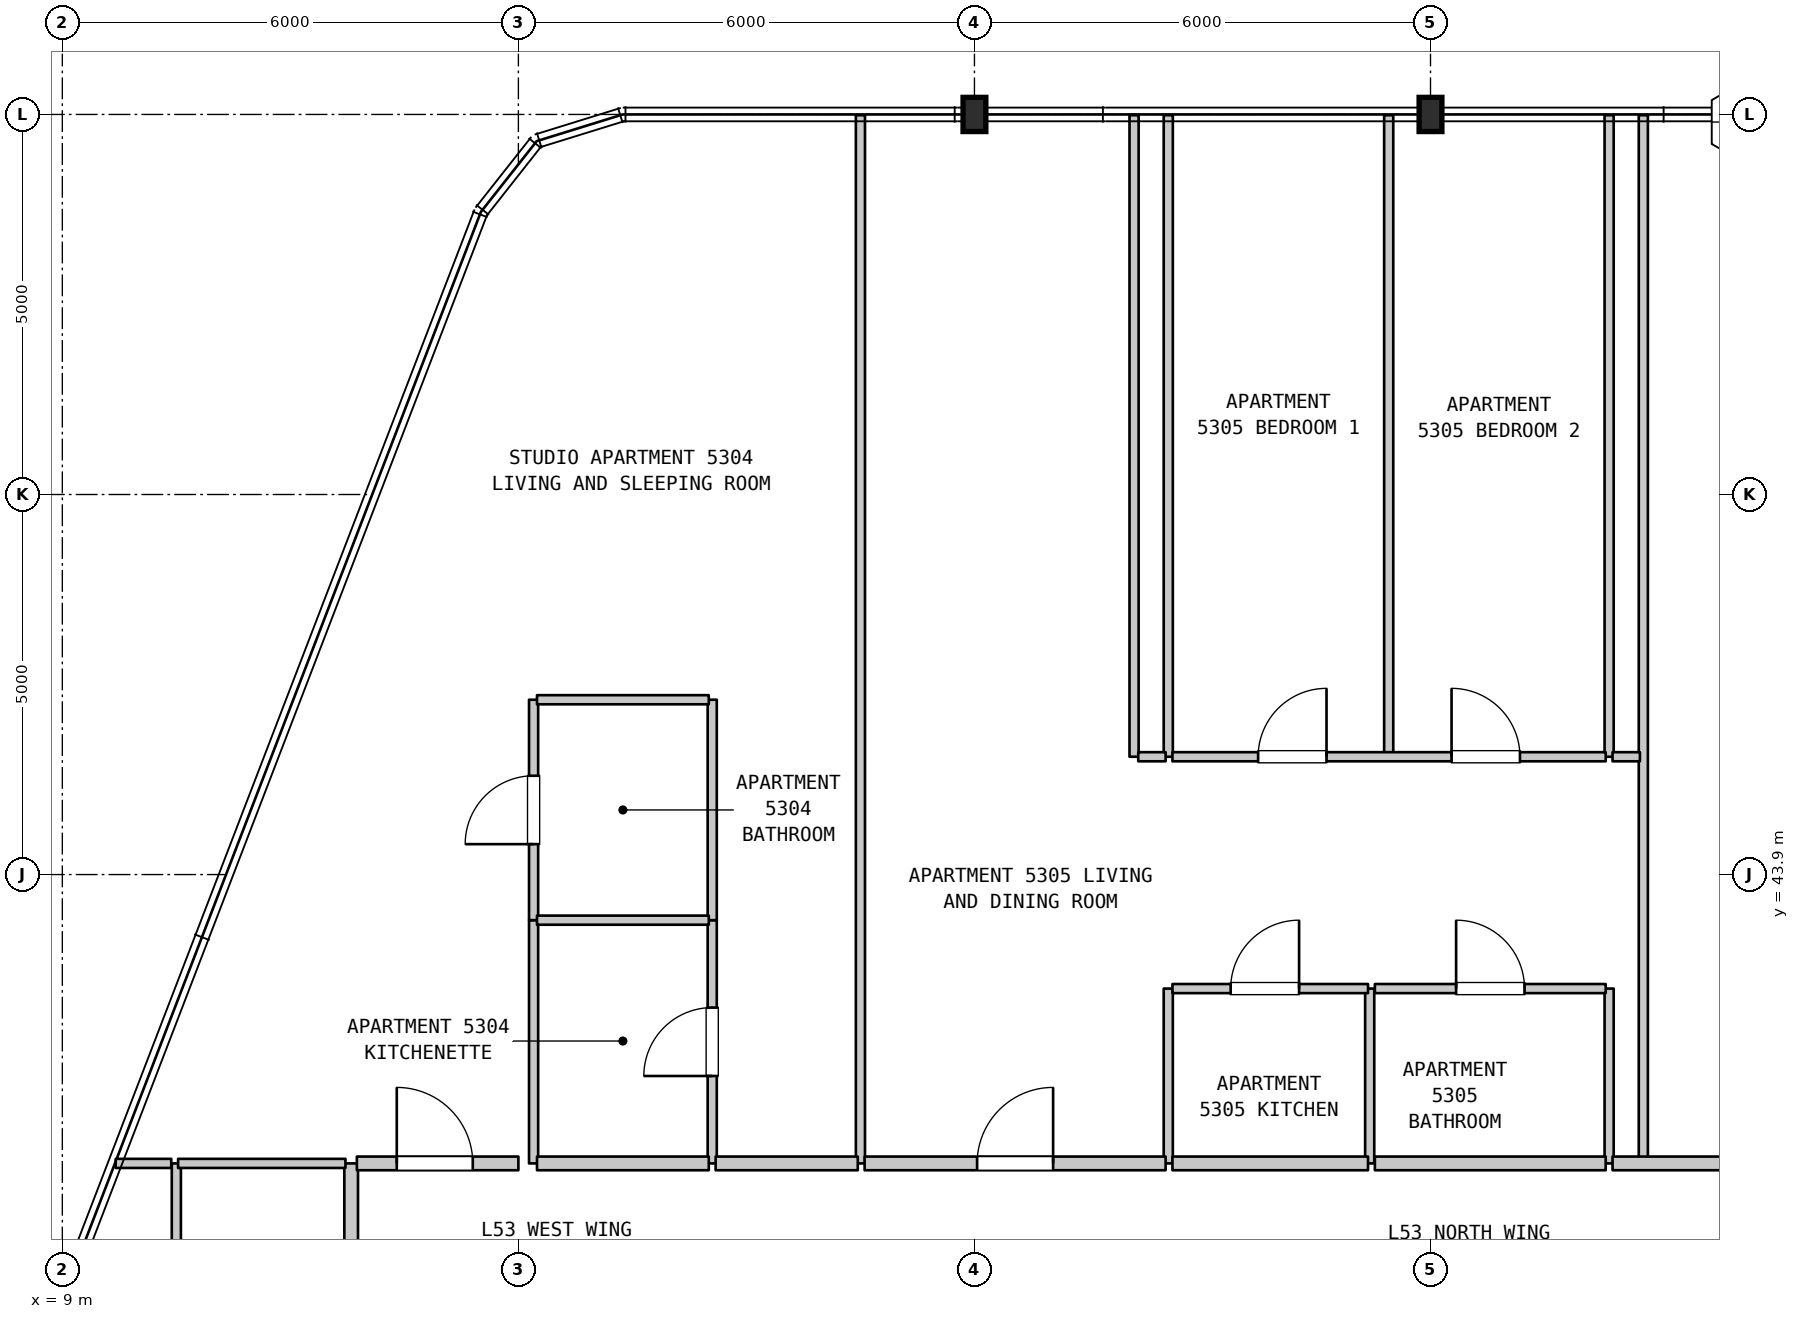
"""IFC4 building model, lengths in metres.
Left out: names, types, materials, properties, quantities, classifications, styles, units other than length and angle.
Written with IfcOpenShell. Run it as: python <this file> out.ifc"""

import sys

from ifc_helpers import new_model, si_unit, direction, frame, frame_2d, origin, origin_2d, place, context, subcontext, project, spatial, rectangle, i_section, extrude, element, fill, save


model = new_model("IFC4")
c1 = context("Model", 3, precision=1e-05, world=origin(), true_north=direction((0.0, 1.0)))
c2 = subcontext(c1, "Body", "Model", "MODEL_VIEW")
j1 = project(units=[si_unit("LENGTHUNIT", "METRE"), si_unit("PLANEANGLEUNIT", "RADIAN")], contexts=[c1])
p1 = place(None, origin())
s1 = spatial("IfcSite", under=j1, at=p1, CompositionType="ELEMENT")
p2 = place(p1, origin())
s2 = spatial("IfcBuilding", under=s1, at=p2, CompositionType="ELEMENT")
p3 = place(p2, frame((0.0, 0.0, 214.3)))
s3 = spatial("IfcBuildingStorey", under=s2, at=p3, CompositionType="ELEMENT", Elevation=214.3)
for number, where, z_axis, x_axis in (
    (1, (21.0, 53.9, 0.0), (0.0, 0.0, 1.0), (1.0, 0.0, 0.0)),
    (2, (27.0, 53.9, 0.0), (0.0, 0.0, 1.0), (1.0, 0.0, 0.0)),
):
    element("IfcColumn", number, at=place(p3, frame(where, z_axis=z_axis, x_axis=x_axis)), inside=s3, PredefinedType="COLUMN", context=c2, shape_type="SweptSolid", body=[
        extrude(i_section(OverallWidth=0.3, OverallDepth=0.45, WebThickness=0.014, FlangeThickness=0.026, FilletRadius=0.027, at=origin_2d()), origin(), (0.0, 0.0, 1.0), 3.7),
    ])
p4 = place(p3, frame((10.5, 31.45, 0.0), z_axis=(0.0, 0.0, 1.0), x_axis=(0.0, 1.0, 0.0)))
e3 = element("IfcWall", 3, at=p4, inside=s3, PredefinedType="PARTITIONING", context=c2, shape_type="SweptSolid", body=[
    extrude(rectangle(XDim=8.65, YDim=0.12, at=frame_2d((4.325, 0.0))), origin(), (0.0, 0.0, 1.0), 3.38),
])
p5 = place(p3, frame((12.8, 31.45, 0.0), z_axis=(0.0, 0.0, 1.0), x_axis=(0.0, 1.0, 0.0)))
e4 = element("IfcWall", 4, at=p5, inside=s3, PredefinedType="STANDARD", context=c2, shape_type="SweptSolid", body=[
    extrude(rectangle(XDim=8.65, YDim=0.18, at=frame_2d((4.325, 0.0))), origin(), (0.0, 0.0, 1.0), 3.38),
])
p6 = place(p3, frame((15.2, 40.1, 0.0), z_axis=(0.0, 0.0, 1.0), x_axis=(0.0, 1.0, 0.0)))
e5 = element("IfcWall", 5, at=p6, inside=s3, PredefinedType="PARTITIONING", context=c2, shape_type="SweptSolid", body=[
    extrude(rectangle(XDim=3.2, YDim=0.12, at=frame_2d((1.6, 0.0))), origin(), (0.0, 0.0, 1.0), 3.38),
])
p7 = place(p3, frame((15.2, 43.3, 0.0), z_axis=(0.0, 0.0, 1.0), x_axis=(0.0, 1.0, 0.0)))
e6 = element("IfcWall", 6, at=p7, inside=s3, PredefinedType="PARTITIONING", context=c2, shape_type="SweptSolid", body=[
    extrude(rectangle(XDim=2.9, YDim=0.12, at=frame_2d((1.45, 0.0))), origin(), (0.0, 0.0, 1.0), 3.38),
])
p8 = place(p7, frame((1.0, 0.0, 0.0)))
e7 = element("IfcOpeningElement", 7, at=p8, cuts=e6, PredefinedType="OPENING", context=c2, shape_type="SweptSolid", body=[
    extrude(rectangle(XDim=0.9, YDim=2.1, at=frame_2d((0.45, 1.05))), frame((0.0, 0.07, 0.0), z_axis=(0.0, -1.0, 0.0), x_axis=(1.0, 0.0, 0.0)), (0.0, 0.0, 1.0), 0.14),
])
p9 = place(p3, frame((17.55, 40.1, 0.0), z_axis=(0.0, 0.0, 1.0), x_axis=(0.0, 1.0, 0.0)))
e8 = element("IfcWall", 8, at=p9, inside=s3, PredefinedType="PARTITIONING", context=c2, shape_type="SweptSolid", body=[
    extrude(rectangle(XDim=3.2, YDim=0.12, at=frame_2d((1.6, 0.0))), origin(), (0.0, 0.0, 1.0), 3.38),
])
p10 = place(p9, frame((1.15, 0.0, 0.0)))
e9 = element("IfcOpeningElement", 9, at=p10, cuts=e8, PredefinedType="OPENING", context=c2, shape_type="SweptSolid", body=[
    extrude(rectangle(XDim=0.9, YDim=2.15, at=frame_2d((0.45, 1.075))), frame((0.0, 0.07, 0.0), z_axis=(0.0, -1.0, 0.0), x_axis=(1.0, 0.0, 0.0)), (0.0, 0.0, 1.0), 0.14),
])
p11 = place(p3, frame((17.55, 43.3, 0.0), z_axis=(0.0, 0.0, 1.0), x_axis=(0.0, 1.0, 0.0)))
e10 = element("IfcWall", 10, at=p11, inside=s3, PredefinedType="PARTITIONING", context=c2, shape_type="SweptSolid", body=[
    extrude(rectangle(XDim=2.9, YDim=0.12, at=frame_2d((1.45, 0.0))), origin(), (0.0, 0.0, 1.0), 3.38),
])
p12 = place(p3, frame((19.5, 40.1, 0.0), z_axis=(0.0, 0.0, 1.0), x_axis=(0.0, 1.0, 0.0)))
e11 = element("IfcWall", 11, at=p12, inside=s3, PredefinedType="PARTITIONING", context=c2, shape_type="SweptSolid", body=[
    extrude(rectangle(XDim=13.79, YDim=0.12, at=frame_2d((6.895, 0.0))), origin(), (0.0, 0.0, 1.0), 3.38),
])
p13 = place(p3, frame((23.1, 45.45, 0.0), z_axis=(0.0, 0.0, 1.0), x_axis=(0.0, 1.0, 0.0)))
e12 = element("IfcWall", 12, at=p13, inside=s3, PredefinedType="PARTITIONING", context=c2, shape_type="SweptSolid", body=[
    extrude(rectangle(XDim=8.44, YDim=0.12, at=frame_2d((4.22, 0.0))), origin(), (0.0, 0.0, 1.0), 3.38),
])
p14 = place(p3, frame((23.55, 40.1, 0.0), z_axis=(0.0, 0.0, 1.0), x_axis=(0.0, 1.0, 0.0)))
e13 = element("IfcWall", 13, at=p14, inside=s3, PredefinedType="PARTITIONING", context=c2, shape_type="SweptSolid", body=[
    extrude(rectangle(XDim=2.3, YDim=0.12, at=frame_2d((1.15, 0.0))), origin(), (0.0, 0.0, 1.0), 3.38),
])
p15 = place(p3, frame((23.55, 45.45, 0.0), z_axis=(0.0, 0.0, 1.0), x_axis=(0.0, 1.0, 0.0)))
e14 = element("IfcWall", 14, at=p15, inside=s3, PredefinedType="PARTITIONING", context=c2, shape_type="SweptSolid", body=[
    extrude(rectangle(XDim=8.44, YDim=0.12, at=frame_2d((4.22, 0.0))), origin(), (0.0, 0.0, 1.0), 3.38),
])
p16 = place(p3, frame((26.2, 40.1, 0.0), z_axis=(0.0, 0.0, 1.0), x_axis=(0.0, 1.0, 0.0)))
e15 = element("IfcWall", 15, at=p16, inside=s3, PredefinedType="PARTITIONING", context=c2, shape_type="SweptSolid", body=[
    extrude(rectangle(XDim=2.3, YDim=0.12, at=frame_2d((1.15, 0.0))), origin(), (0.0, 0.0, 1.0), 3.38),
])
p17 = place(p3, frame((26.45, 45.45, 0.0), z_axis=(0.0, 0.0, 1.0), x_axis=(0.0, 1.0, 0.0)))
e16 = element("IfcWall", 16, at=p17, inside=s3, PredefinedType="PARTITIONING", context=c2, shape_type="SweptSolid", body=[
    extrude(rectangle(XDim=8.44, YDim=0.12, at=frame_2d((4.22, 0.0))), origin(), (0.0, 0.0, 1.0), 3.38),
])
p18 = place(p3, frame((29.35, 40.1, 0.0), z_axis=(0.0, 0.0, 1.0), x_axis=(0.0, 1.0, 0.0)))
e17 = element("IfcWall", 17, at=p18, inside=s3, PredefinedType="PARTITIONING", context=c2, shape_type="SweptSolid", body=[
    extrude(rectangle(XDim=2.3, YDim=0.12, at=frame_2d((1.15, 0.0))), origin(), (0.0, 0.0, 1.0), 3.38),
])
p19 = place(p3, frame((29.35, 45.45, 0.0), z_axis=(0.0, 0.0, 1.0), x_axis=(0.0, 1.0, 0.0)))
e18 = element("IfcWall", 18, at=p19, inside=s3, PredefinedType="PARTITIONING", context=c2, shape_type="SweptSolid", body=[
    extrude(rectangle(XDim=8.44, YDim=0.12, at=frame_2d((4.22, 0.0))), origin(), (0.0, 0.0, 1.0), 3.38),
])
p20 = place(p3, frame((29.8, 40.1, 0.0), z_axis=(0.0, 0.0, 1.0), x_axis=(0.0, 1.0, 0.0)))
e19 = element("IfcWall", 19, at=p20, inside=s3, PredefinedType="PARTITIONING", context=c2, shape_type="SweptSolid", body=[
    extrude(rectangle(XDim=13.79, YDim=0.12, at=frame_2d((6.895, 0.0))), origin(), (0.0, 0.0, 1.0), 3.38),
])
p21 = place(p3, frame((9.702, 40.1, 0.0), z_axis=(0.0, 0.0, 1.0), x_axis=(1.0, 0.0, 0.0)))
e20 = element("IfcWall", 20, at=p21, inside=s3, PredefinedType="PARTITIONING", context=c2, shape_type="SweptSolid", body=[
    extrude(rectangle(XDim=0.731, YDim=0.12, at=frame_2d((0.366, 0.0))), origin(), (0.0, 0.0, 1.0), 3.38),
])
p22 = place(p3, frame((10.523, 40.1, 0.0), z_axis=(0.0, 0.0, 1.0), x_axis=(1.0, 0.0, 0.0)))
e21 = element("IfcWall", 21, at=p22, inside=s3, PredefinedType="PARTITIONING", context=c2, shape_type="SweptSolid", body=[
    extrude(rectangle(XDim=2.202, YDim=0.12, at=frame_2d((1.101, 0.0))), origin(), (0.0, 0.0, 1.0), 3.38),
])
p23 = place(p3, frame((12.875, 40.1, 0.0), z_axis=(0.0, 0.0, 1.0), x_axis=(1.0, 0.0, 0.0)))
e22 = element("IfcWall", 22, at=p23, inside=s3, PredefinedType="STANDARD", context=c2, shape_type="SweptSolid", body=[
    extrude(rectangle(XDim=2.125, YDim=0.18, at=frame_2d((1.062, 0.0))), origin(), (0.0, 0.0, 1.0), 3.38),
])
p24 = place(p23, frame((0.525, 0.0, 0.0)))
e23 = element("IfcOpeningElement", 23, at=p24, cuts=e22, PredefinedType="OPENING", context=c2, shape_type="SweptSolid", body=[
    extrude(rectangle(XDim=1.0, YDim=2.15, at=frame_2d((0.5, 1.075))), frame((0.0, 0.1, 0.0), z_axis=(0.0, -1.0, 0.0), x_axis=(1.0, 0.0, 0.0)), (0.0, 0.0, 1.0), 0.2),
])
p25 = place(p3, frame((15.245, 40.1, 0.0), z_axis=(0.0, 0.0, 1.0), x_axis=(1.0, 0.0, 0.0)))
e24 = element("IfcWall", 24, at=p25, inside=s3, PredefinedType="STANDARD", context=c2, shape_type="SweptSolid", body=[
    extrude(rectangle(XDim=2.26, YDim=0.18, at=frame_2d((1.13, 0.0))), origin(), (0.0, 0.0, 1.0), 3.38),
])
p26 = place(p3, frame((17.595, 40.1, 0.0), z_axis=(0.0, 0.0, 1.0), x_axis=(1.0, 0.0, 0.0)))
e25 = element("IfcWall", 25, at=p26, inside=s3, PredefinedType="STANDARD", context=c2, shape_type="SweptSolid", body=[
    extrude(rectangle(XDim=1.87, YDim=0.18, at=frame_2d((0.935, 0.0))), origin(), (0.0, 0.0, 1.0), 3.38),
])
p27 = place(p3, frame((19.555, 40.1, 0.0), z_axis=(0.0, 0.0, 1.0), x_axis=(1.0, 0.0, 0.0)))
e26 = element("IfcWall", 26, at=p27, inside=s3, PredefinedType="STANDARD", context=c2, shape_type="SweptSolid", body=[
    extrude(rectangle(XDim=3.96, YDim=0.18, at=frame_2d((1.98, 0.0))), origin(), (0.0, 0.0, 1.0), 3.38),
])
p28 = place(p27, frame((1.48, 0.0, 0.0)))
e27 = element("IfcOpeningElement", 27, at=p28, cuts=e26, PredefinedType="OPENING", context=c2, shape_type="SweptSolid", body=[
    extrude(rectangle(XDim=1.0, YDim=2.15, at=frame_2d((0.5, 1.075))), frame((0.0, 0.1, 0.0), z_axis=(0.0, -1.0, 0.0), x_axis=(1.0, 0.0, 0.0)), (0.0, 0.0, 1.0), 0.2),
])
p29 = place(p3, frame((23.605, 40.1, 0.0), z_axis=(0.0, 0.0, 1.0), x_axis=(1.0, 0.0, 0.0)))
e28 = element("IfcWall", 28, at=p29, inside=s3, PredefinedType="STANDARD", context=c2, shape_type="SweptSolid", body=[
    extrude(rectangle(XDim=2.573, YDim=0.18, at=frame_2d((1.287, 0.0))), origin(), (0.0, 0.0, 1.0), 3.38),
])
p30 = place(p3, frame((26.268, 40.1, 0.0), z_axis=(0.0, 0.0, 1.0), x_axis=(1.0, 0.0, 0.0)))
e29 = element("IfcWall", 29, at=p30, inside=s3, PredefinedType="STANDARD", context=c2, shape_type="SweptSolid", body=[
    extrude(rectangle(XDim=3.037, YDim=0.18, at=frame_2d((1.519, 0.0))), origin(), (0.0, 0.0, 1.0), 3.38),
])
p31 = place(p3, frame((29.395, 40.1, 0.0), z_axis=(0.0, 0.0, 1.0), x_axis=(1.0, 0.0, 0.0)))
e30 = element("IfcWall", 30, at=p31, inside=s3, PredefinedType="STANDARD", context=c2, shape_type="SweptSolid", body=[
    extrude(rectangle(XDim=5.09, YDim=0.18, at=frame_2d((2.545, 0.0))), origin(), (0.0, 0.0, 1.0), 3.38),
])
p32 = place(p31, frame((2.174, 0.0, 0.0)))
e31 = element("IfcOpeningElement", 31, at=p32, cuts=e30, PredefinedType="OPENING", context=c2, shape_type="SweptSolid", body=[
    extrude(rectangle(XDim=1.0, YDim=2.15, at=frame_2d((0.5, 1.075))), frame((0.0, 0.1, 0.0), z_axis=(0.0, -1.0, 0.0), x_axis=(1.0, 0.0, 0.0)), (0.0, 0.0, 1.0), 0.2),
])
p33 = place(p3, frame((23.605, 42.4, 0.0), z_axis=(0.0, 0.0, 1.0), x_axis=(1.0, 0.0, 0.0)))
e32 = element("IfcWall", 32, at=p33, inside=s3, PredefinedType="PARTITIONING", context=c2, shape_type="SweptSolid", body=[
    extrude(rectangle(XDim=2.573, YDim=0.12, at=frame_2d((1.287, 0.0))), origin(), (0.0, 0.0, 1.0), 3.38),
])
p34 = place(p33, frame((0.766, 0.0, 0.0)))
e33 = element("IfcOpeningElement", 33, at=p34, cuts=e32, PredefinedType="OPENING", context=c2, shape_type="SweptSolid", body=[
    extrude(rectangle(XDim=0.9, YDim=2.15, at=frame_2d((0.45, 1.075))), frame((0.0, 0.07, 0.0), z_axis=(0.0, -1.0, 0.0), x_axis=(1.0, 0.0, 0.0)), (0.0, 0.0, 1.0), 0.14),
])
p35 = place(p3, frame((26.268, 42.4, 0.0), z_axis=(0.0, 0.0, 1.0), x_axis=(1.0, 0.0, 0.0)))
e34 = element("IfcWall", 34, at=p35, inside=s3, PredefinedType="PARTITIONING", context=c2, shape_type="SweptSolid", body=[
    extrude(rectangle(XDim=3.037, YDim=0.12, at=frame_2d((1.519, 0.0))), origin(), (0.0, 0.0, 1.0), 3.38),
])
p36 = place(p35, frame((1.069, 0.0, 0.0)))
e35 = element("IfcOpeningElement", 35, at=p36, cuts=e34, PredefinedType="OPENING", context=c2, shape_type="SweptSolid", body=[
    extrude(rectangle(XDim=0.9, YDim=2.1, at=frame_2d((0.45, 1.05))), frame((0.0, 0.07, 0.0), z_axis=(0.0, -1.0, 0.0), x_axis=(1.0, 0.0, 0.0)), (0.0, 0.0, 1.0), 0.14),
])
p37 = place(p3, frame((15.245, 43.3, 0.0), z_axis=(0.0, 0.0, 1.0), x_axis=(1.0, 0.0, 0.0)))
e36 = element("IfcWall", 36, at=p37, inside=s3, PredefinedType="PARTITIONING", context=c2, shape_type="SweptSolid", body=[
    extrude(rectangle(XDim=2.26, YDim=0.12, at=frame_2d((1.13, 0.0))), origin(), (0.0, 0.0, 1.0), 3.38),
])
p38 = place(p3, frame((23.155, 45.45, 0.0), z_axis=(0.0, 0.0, 1.0), x_axis=(1.0, 0.0, 0.0)))
e37 = element("IfcWall", 37, at=p38, inside=s3, PredefinedType="PARTITIONING", context=c2, shape_type="SweptSolid", body=[
    extrude(rectangle(XDim=0.36, YDim=0.12, at=frame_2d((0.18, 0.0))), origin(), (0.0, 0.0, 1.0), 3.38),
])
p39 = place(p3, frame((23.605, 45.45, 0.0), z_axis=(0.0, 0.0, 1.0), x_axis=(1.0, 0.0, 0.0)))
e38 = element("IfcWall", 38, at=p39, inside=s3, PredefinedType="PARTITIONING", context=c2, shape_type="SweptSolid", body=[
    extrude(rectangle(XDim=5.7, YDim=0.12, at=frame_2d((2.85, 0.0))), origin(), (0.0, 0.0, 1.0), 3.38),
])
p40 = place(p39, frame((1.127, 0.0, 0.0)))
e39 = element("IfcOpeningElement", 39, at=p40, cuts=e38, PredefinedType="OPENING", context=c2, shape_type="SweptSolid", body=[
    extrude(rectangle(XDim=0.9, YDim=2.15, at=frame_2d((0.45, 1.075))), frame((0.0, 0.07, 0.0), z_axis=(0.0, -1.0, 0.0), x_axis=(1.0, 0.0, 0.0)), (0.0, 0.0, 1.0), 0.14),
])
p41 = place(p39, frame((3.672, 0.0, 0.0)))
e40 = element("IfcOpeningElement", 40, at=p41, cuts=e38, PredefinedType="OPENING", context=c2, shape_type="SweptSolid", body=[
    extrude(rectangle(XDim=0.9, YDim=2.15, at=frame_2d((0.45, 1.075))), frame((0.0, 0.07, 0.0), z_axis=(0.0, -1.0, 0.0), x_axis=(1.0, 0.0, 0.0)), (0.0, 0.0, 1.0), 0.14),
])
p42 = place(p3, frame((29.395, 45.45, 0.0), z_axis=(0.0, 0.0, 1.0), x_axis=(1.0, 0.0, 0.0)))
e41 = element("IfcWall", 41, at=p42, inside=s3, PredefinedType="PARTITIONING", context=c2, shape_type="SweptSolid", body=[
    extrude(rectangle(XDim=0.36, YDim=0.12, at=frame_2d((0.18, 0.0))), origin(), (0.0, 0.0, 1.0), 3.38),
])
p43 = place(p3, frame((15.245, 46.2, 0.0), z_axis=(0.0, 0.0, 1.0), x_axis=(1.0, 0.0, 0.0)))
e42 = element("IfcWall", 42, at=p43, inside=s3, PredefinedType="PARTITIONING", context=c2, shape_type="SweptSolid", body=[
    extrude(rectangle(XDim=2.26, YDim=0.12, at=frame_2d((1.13, 0.0))), origin(), (0.0, 0.0, 1.0), 3.38),
])
p44 = place(p8, origin())
e43 = element("IfcDoor", 43, at=p44, inside=s3, OperationType="SINGLE_SWING_LEFT", PredefinedType="DOOR", context=c2, shape_type="SweptSolid", body=[
    extrude(rectangle(XDim=0.9, YDim=2.1, at=frame_2d((0.45, 1.05))), frame((0.0, 0.025, 0.0), z_axis=(0.0, -1.0, 0.0), x_axis=(1.0, 0.0, 0.0)), (0.0, 0.0, 1.0), 0.05),
])
fill(e7, e43)
p45 = place(p10, origin())
e44 = element("IfcDoor", 44, at=p45, inside=s3, OperationType="SINGLE_SWING_LEFT", PredefinedType="DOOR", context=c2, shape_type="SweptSolid", body=[
    extrude(rectangle(XDim=0.9, YDim=2.15, at=frame_2d((0.45, 1.075))), frame((0.0, 0.025, 0.0), z_axis=(0.0, -1.0, 0.0), x_axis=(1.0, 0.0, 0.0)), (0.0, 0.0, 1.0), 0.05),
])
fill(e9, e44)
p46 = place(p24, origin())
e45 = element("IfcDoor", 45, at=p46, inside=s3, OperationType="SINGLE_SWING_LEFT", PredefinedType="DOOR", context=c2, shape_type="SweptSolid", body=[
    extrude(rectangle(XDim=1.0, YDim=2.15, at=frame_2d((0.5, 1.075))), frame((0.0, 0.025, 0.0), z_axis=(0.0, -1.0, 0.0), x_axis=(1.0, 0.0, 0.0)), (0.0, 0.0, 1.0), 0.05),
])
fill(e23, e45)
p47 = place(p28, origin())
e46 = element("IfcDoor", 46, at=p47, inside=s3, OperationType="SINGLE_SWING_RIGHT", PredefinedType="DOOR", context=c2, shape_type="SweptSolid", body=[
    extrude(rectangle(XDim=1.0, YDim=2.15, at=frame_2d((0.5, 1.075))), frame((0.0, 0.025, 0.0), z_axis=(0.0, -1.0, 0.0), x_axis=(1.0, 0.0, 0.0)), (0.0, 0.0, 1.0), 0.05),
])
fill(e27, e46)
p48 = place(p34, origin())
e47 = element("IfcDoor", 47, at=p48, inside=s3, OperationType="SINGLE_SWING_RIGHT", PredefinedType="DOOR", context=c2, shape_type="SweptSolid", body=[
    extrude(rectangle(XDim=0.9, YDim=2.15, at=frame_2d((0.45, 1.075))), frame((0.0, 0.025, 0.0), z_axis=(0.0, -1.0, 0.0), x_axis=(1.0, 0.0, 0.0)), (0.0, 0.0, 1.0), 0.05),
])
fill(e33, e47)
p49 = place(p36, origin())
e48 = element("IfcDoor", 48, at=p49, inside=s3, OperationType="SINGLE_SWING_LEFT", PredefinedType="DOOR", context=c2, shape_type="SweptSolid", body=[
    extrude(rectangle(XDim=0.9, YDim=2.1, at=frame_2d((0.45, 1.05))), frame((0.0, 0.025, 0.0), z_axis=(0.0, -1.0, 0.0), x_axis=(1.0, 0.0, 0.0)), (0.0, 0.0, 1.0), 0.05),
])
fill(e35, e48)
p50 = place(p40, origin())
e49 = element("IfcDoor", 49, at=p50, inside=s3, OperationType="SINGLE_SWING_RIGHT", PredefinedType="DOOR", context=c2, shape_type="SweptSolid", body=[
    extrude(rectangle(XDim=0.9, YDim=2.15, at=frame_2d((0.45, 1.075))), frame((0.0, 0.025, 0.0), z_axis=(0.0, -1.0, 0.0), x_axis=(1.0, 0.0, 0.0)), (0.0, 0.0, 1.0), 0.05),
])
fill(e39, e49)
p51 = place(p41, origin())
e50 = element("IfcDoor", 50, at=p51, inside=s3, OperationType="SINGLE_SWING_LEFT", PredefinedType="DOOR", context=c2, shape_type="SweptSolid", body=[
    extrude(rectangle(XDim=0.9, YDim=2.15, at=frame_2d((0.45, 1.075))), frame((0.0, 0.025, 0.0), z_axis=(0.0, -1.0, 0.0), x_axis=(1.0, 0.0, 0.0)), (0.0, 0.0, 1.0), 0.05),
])
fill(e40, e50)
save(model, sys.argv[1])
